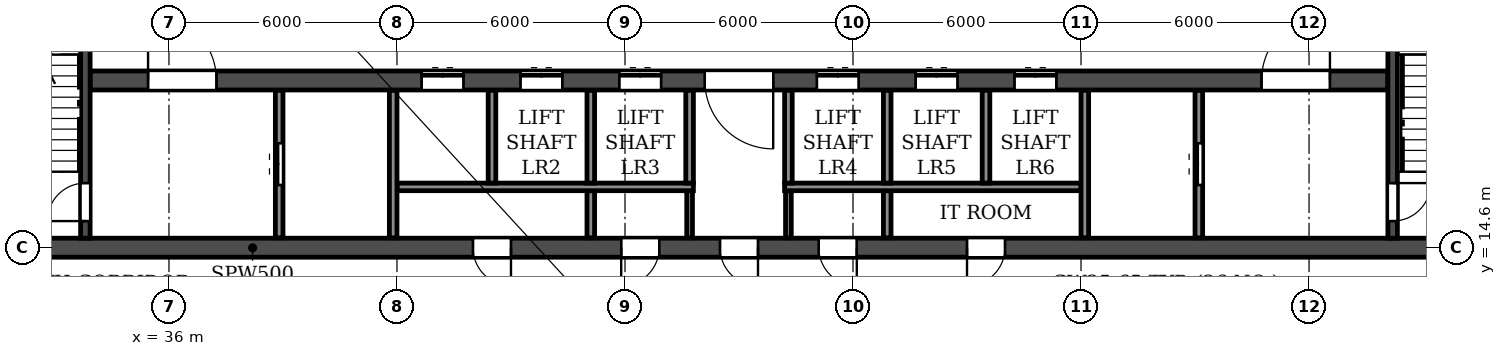
"""IFC4 building model, lengths in metres.
Left out: names, types, materials, properties, quantities, classifications, styles, units other than length and angle.
Written with IfcOpenShell. Run it as: python <this file> out.ifc"""

import sys

from ifc_helpers import new_model, si_unit, direction, frame, frame_2d, origin, place, context, subcontext, project, spatial, rectangle, extrude, element, fill, save


model = new_model("IFC4")
c1 = context("Model", 3, precision=1e-05, world=origin(), true_north=direction((0.0, 1.0)))
c2 = subcontext(c1, "Body", "Model", "MODEL_VIEW")
j1 = project(units=[si_unit("LENGTHUNIT", "METRE"), si_unit("PLANEANGLEUNIT", "RADIAN")], contexts=[c1])
p1 = place(None, origin())
s1 = spatial("IfcSite", under=j1, at=p1, CompositionType="ELEMENT")
p2 = place(p1, origin())
s2 = spatial("IfcBuilding", under=s1, at=p2, CompositionType="ELEMENT")
p3 = place(p2, frame((0.0, 0.0, 76.2)))
s3 = spatial("IfcBuildingStorey", under=s2, at=p3, CompositionType="ELEMENT", Elevation=76.2)
p4 = place(p3, frame((8.6, 14.6, 0.0), z_axis=(0.0, 0.0, 1.0), x_axis=(1.0, 0.0, 0.0)))
e1 = element("IfcWall", 1, at=p4, inside=s3, PredefinedType="SOLIDWALL", context=c2, shape_type="SweptSolid", body=[
    extrude(rectangle(XDim=84.8, YDim=0.5, at=frame_2d((42.4, 0.0))), origin(), (0.0, 0.0, 1.0), 3.06),
])
p5 = place(p4, frame((2.25, 0.0, 0.0)))
e2 = element("IfcOpeningElement", 2, at=p5, cuts=e1, PredefinedType="OPENING", context=c2, shape_type="SweptSolid", body=[
    extrude(rectangle(XDim=1.0, YDim=2.1, at=frame_2d((0.5, 1.05))), frame((0.0, 0.26, 0.0), z_axis=(0.0, -1.0, 0.0), x_axis=(1.0, 0.0, 0.0)), (0.0, 0.0, 1.0), 0.52),
])
p6 = place(p4, frame((6.95, 0.0, 0.0)))
e3 = element("IfcOpeningElement", 3, at=p6, cuts=e1, PredefinedType="OPENING", context=c2, shape_type="SweptSolid", body=[
    extrude(rectangle(XDim=1.0, YDim=2.1, at=frame_2d((0.5, 1.05))), frame((0.0, 0.26, 0.0), z_axis=(0.0, -1.0, 0.0), x_axis=(1.0, 0.0, 0.0)), (0.0, 0.0, 1.0), 0.52),
])
p7 = place(p4, frame((10.3, 0.0, 0.0)))
e4 = element("IfcOpeningElement", 4, at=p7, cuts=e1, PredefinedType="OPENING", context=c2, shape_type="SweptSolid", body=[
    extrude(rectangle(XDim=1.0, YDim=2.1, at=frame_2d((0.5, 1.05))), frame((0.0, 0.26, 0.0), z_axis=(0.0, -1.0, 0.0), x_axis=(1.0, 0.0, 0.0)), (0.0, 0.0, 1.0), 0.52),
])
p8 = place(p4, frame((18.2, 0.0, 0.0)))
e5 = element("IfcOpeningElement", 5, at=p8, cuts=e1, PredefinedType="OPENING", context=c2, shape_type="SweptSolid", body=[
    extrude(rectangle(XDim=1.0, YDim=2.1, at=frame_2d((0.5, 1.05))), frame((0.0, 0.26, 0.0), z_axis=(0.0, -1.0, 0.0), x_axis=(1.0, 0.0, 0.0)), (0.0, 0.0, 1.0), 0.52),
])
p9 = place(p4, frame((22.8, 0.0, 0.0)))
e6 = element("IfcOpeningElement", 6, at=p9, cuts=e1, PredefinedType="OPENING", context=c2, shape_type="SweptSolid", body=[
    extrude(rectangle(XDim=1.0, YDim=2.1, at=frame_2d((0.5, 1.05))), frame((0.0, 0.26, 0.0), z_axis=(0.0, -1.0, 0.0), x_axis=(1.0, 0.0, 0.0)), (0.0, 0.0, 1.0), 0.52),
])
p10 = place(p4, frame((35.4, 0.0, 0.0)))
e7 = element("IfcOpeningElement", 7, at=p10, cuts=e1, PredefinedType="OPENING", context=c2, shape_type="SweptSolid", body=[
    extrude(rectangle(XDim=1.0, YDim=2.1, at=frame_2d((0.5, 1.05))), frame((0.0, 0.26, 0.0), z_axis=(0.0, -1.0, 0.0), x_axis=(1.0, 0.0, 0.0)), (0.0, 0.0, 1.0), 0.52),
])
p11 = place(p4, frame((39.3, 0.0, 0.0)))
e8 = element("IfcOpeningElement", 8, at=p11, cuts=e1, PredefinedType="OPENING", context=c2, shape_type="SweptSolid", body=[
    extrude(rectangle(XDim=1.0, YDim=2.1, at=frame_2d((0.5, 1.05))), frame((0.0, 0.26, 0.0), z_axis=(0.0, -1.0, 0.0), x_axis=(1.0, 0.0, 0.0)), (0.0, 0.0, 1.0), 0.52),
])
p12 = place(p4, frame((41.9, 0.0, 0.0)))
e9 = element("IfcOpeningElement", 9, at=p12, cuts=e1, PredefinedType="OPENING", context=c2, shape_type="SweptSolid", body=[
    extrude(rectangle(XDim=1.0, YDim=2.1, at=frame_2d((0.5, 1.05))), frame((0.0, 0.26, 0.0), z_axis=(0.0, -1.0, 0.0), x_axis=(1.0, 0.0, 0.0)), (0.0, 0.0, 1.0), 0.52),
])
p13 = place(p4, frame((44.5, 0.0, 0.0)))
e10 = element("IfcOpeningElement", 10, at=p13, cuts=e1, PredefinedType="OPENING", context=c2, shape_type="SweptSolid", body=[
    extrude(rectangle(XDim=1.0, YDim=2.1, at=frame_2d((0.5, 1.05))), frame((0.0, 0.26, 0.0), z_axis=(0.0, -1.0, 0.0), x_axis=(1.0, 0.0, 0.0)), (0.0, 0.0, 1.0), 0.52),
])
p14 = place(p4, frame((48.4, 0.0, 0.0)))
e11 = element("IfcOpeningElement", 11, at=p14, cuts=e1, PredefinedType="OPENING", context=c2, shape_type="SweptSolid", body=[
    extrude(rectangle(XDim=1.0, YDim=2.1, at=frame_2d((0.5, 1.05))), frame((0.0, 0.26, 0.0), z_axis=(0.0, -1.0, 0.0), x_axis=(1.0, 0.0, 0.0)), (0.0, 0.0, 1.0), 0.52),
])
p15 = place(p4, frame((61.0, 0.0, 0.0)))
e12 = element("IfcOpeningElement", 12, at=p15, cuts=e1, PredefinedType="OPENING", context=c2, shape_type="SweptSolid", body=[
    extrude(rectangle(XDim=1.0, YDim=2.1, at=frame_2d((0.5, 1.05))), frame((0.0, 0.26, 0.0), z_axis=(0.0, -1.0, 0.0), x_axis=(1.0, 0.0, 0.0)), (0.0, 0.0, 1.0), 0.52),
])
p16 = place(p4, frame((65.6, 0.0, 0.0)))
e13 = element("IfcOpeningElement", 13, at=p16, cuts=e1, PredefinedType="OPENING", context=c2, shape_type="SweptSolid", body=[
    extrude(rectangle(XDim=1.0, YDim=2.1, at=frame_2d((0.5, 1.05))), frame((0.0, 0.26, 0.0), z_axis=(0.0, -1.0, 0.0), x_axis=(1.0, 0.0, 0.0)), (0.0, 0.0, 1.0), 0.52),
])
p17 = place(p4, frame((73.5, 0.0, 0.0)))
e14 = element("IfcOpeningElement", 14, at=p17, cuts=e1, PredefinedType="OPENING", context=c2, shape_type="SweptSolid", body=[
    extrude(rectangle(XDim=1.0, YDim=2.1, at=frame_2d((0.5, 1.05))), frame((0.0, 0.26, 0.0), z_axis=(0.0, -1.0, 0.0), x_axis=(1.0, 0.0, 0.0)), (0.0, 0.0, 1.0), 0.52),
])
p18 = place(p4, frame((76.55, 0.0, 0.0)))
e15 = element("IfcOpeningElement", 15, at=p18, cuts=e1, PredefinedType="OPENING", context=c2, shape_type="SweptSolid", body=[
    extrude(rectangle(XDim=1.0, YDim=2.1, at=frame_2d((0.5, 1.05))), frame((0.0, 0.26, 0.0), z_axis=(0.0, -1.0, 0.0), x_axis=(1.0, 0.0, 0.0)), (0.0, 0.0, 1.0), 0.52),
])
p19 = place(p4, frame((81.0, 0.0, 0.0)))
e16 = element("IfcOpeningElement", 16, at=p19, cuts=e1, PredefinedType="OPENING", context=c2, shape_type="SweptSolid", body=[
    extrude(rectangle(XDim=1.5, YDim=2.1, at=frame_2d((0.75, 1.05))), frame((0.0, 0.26, 0.0), z_axis=(0.0, -1.0, 0.0), x_axis=(1.0, 0.0, 0.0)), (0.0, 0.0, 1.0), 0.52),
])
p20 = place(p3, frame((33.925, 19.0, 0.0), z_axis=(0.0, 0.0, 1.0), x_axis=(1.0, 0.0, 0.0)))
e17 = element("IfcWall", 17, at=p20, inside=s3, PredefinedType="SOLIDWALL", context=c2, shape_type="SweptSolid", body=[
    extrude(rectangle(XDim=34.15, YDim=0.5, at=frame_2d((17.075, 0.0))), origin(), (0.0, 0.0, 1.0), 3.06),
])
p21 = place(p20, frame((16.175, 0.0, 0.0)))
e18 = element("IfcOpeningElement", 18, at=p21, cuts=e17, PredefinedType="OPENING", context=c2, shape_type="SweptSolid", body=[
    extrude(rectangle(XDim=1.8, YDim=2.1, at=frame_2d((0.9, 1.05))), frame((0.0, 0.26, 0.0), z_axis=(0.0, -1.0, 0.0), x_axis=(1.0, 0.0, 0.0)), (0.0, 0.0, 1.0), 0.52),
])
p22 = place(p20, frame((1.525, 0.0, 0.0)))
e19 = element("IfcOpeningElement", 19, at=p22, cuts=e17, PredefinedType="OPENING", context=c2, shape_type="SweptSolid", body=[
    extrude(rectangle(XDim=1.8, YDim=2.1, at=frame_2d((0.9, 1.05))), frame((0.0, 0.26, 0.0), z_axis=(0.0, -1.0, 0.0), x_axis=(1.0, 0.0, 0.0)), (0.0, 0.0, 1.0), 0.52),
])
p23 = place(p20, frame((8.725, 0.0, 0.0)))
e20 = element("IfcOpeningElement", 20, at=p23, cuts=e17, PredefinedType="OPENING", context=c2, shape_type="SweptSolid", body=[
    extrude(rectangle(XDim=1.1, YDim=2.1, at=frame_2d((0.55, 1.05))), frame((0.0, 0.26, 0.0), z_axis=(0.0, -1.0, 0.0), x_axis=(1.0, 0.0, 0.0)), (0.0, 0.0, 1.0), 0.52),
])
p24 = place(p20, frame((11.325, 0.0, 0.0)))
e21 = element("IfcOpeningElement", 21, at=p24, cuts=e17, PredefinedType="OPENING", context=c2, shape_type="SweptSolid", body=[
    extrude(rectangle(XDim=1.1, YDim=2.1, at=frame_2d((0.55, 1.05))), frame((0.0, 0.26, 0.0), z_axis=(0.0, -1.0, 0.0), x_axis=(1.0, 0.0, 0.0)), (0.0, 0.0, 1.0), 0.52),
])
p25 = place(p20, frame((13.925, 0.0, 0.0)))
e22 = element("IfcOpeningElement", 22, at=p25, cuts=e17, PredefinedType="OPENING", context=c2, shape_type="SweptSolid", body=[
    extrude(rectangle(XDim=1.1, YDim=2.1, at=frame_2d((0.55, 1.05))), frame((0.0, 0.26, 0.0), z_axis=(0.0, -1.0, 0.0), x_axis=(1.0, 0.0, 0.0)), (0.0, 0.0, 1.0), 0.52),
])
p26 = place(p20, frame((19.125, 0.0, 0.0)))
e23 = element("IfcOpeningElement", 23, at=p26, cuts=e17, PredefinedType="OPENING", context=c2, shape_type="SweptSolid", body=[
    extrude(rectangle(XDim=1.1, YDim=2.1, at=frame_2d((0.55, 1.05))), frame((0.0, 0.26, 0.0), z_axis=(0.0, -1.0, 0.0), x_axis=(1.0, 0.0, 0.0)), (0.0, 0.0, 1.0), 0.52),
])
p27 = place(p20, frame((21.725, 0.0, 0.0)))
e24 = element("IfcOpeningElement", 24, at=p27, cuts=e17, PredefinedType="OPENING", context=c2, shape_type="SweptSolid", body=[
    extrude(rectangle(XDim=1.1, YDim=2.1, at=frame_2d((0.55, 1.05))), frame((0.0, 0.26, 0.0), z_axis=(0.0, -1.0, 0.0), x_axis=(1.0, 0.0, 0.0)), (0.0, 0.0, 1.0), 0.52),
])
p28 = place(p20, frame((24.325, 0.0, 0.0)))
e25 = element("IfcOpeningElement", 25, at=p28, cuts=e17, PredefinedType="OPENING", context=c2, shape_type="SweptSolid", body=[
    extrude(rectangle(XDim=1.1, YDim=2.1, at=frame_2d((0.55, 1.05))), frame((0.0, 0.26, 0.0), z_axis=(0.0, -1.0, 0.0), x_axis=(1.0, 0.0, 0.0)), (0.0, 0.0, 1.0), 0.52),
])
p29 = place(p20, frame((30.825, 0.0, 0.0)))
e26 = element("IfcOpeningElement", 26, at=p29, cuts=e17, PredefinedType="OPENING", context=c2, shape_type="SweptSolid", body=[
    extrude(rectangle(XDim=1.8, YDim=2.1, at=frame_2d((0.9, 1.05))), frame((0.0, 0.26, 0.0), z_axis=(0.0, -1.0, 0.0), x_axis=(1.0, 0.0, 0.0)), (0.0, 0.0, 1.0), 0.52),
])
p30 = place(p3, frame((33.8, 14.85, 0.0), z_axis=(0.0, 0.0, 1.0), x_axis=(0.0, 1.0, 0.0)))
e27 = element("IfcWall", 27, at=p30, inside=s3, PredefinedType="SOLIDWALL", context=c2, shape_type="SweptSolid", body=[
    extrude(rectangle(XDim=7.625, YDim=0.25, at=frame_2d((3.812, 0.0))), origin(), (0.0, 0.0, 1.0), 3.06),
])
p31 = place(p30, frame((0.45, 0.0, 0.0)))
e28 = element("IfcOpeningElement", 28, at=p31, cuts=e27, PredefinedType="OPENING", context=c2, shape_type="SweptSolid", body=[
    extrude(rectangle(XDim=1.0, YDim=2.1, at=frame_2d((0.5, 1.05))), frame((0.0, 0.135, 0.0), z_axis=(0.0, -1.0, 0.0), x_axis=(1.0, 0.0, 0.0)), (0.0, 0.0, 1.0), 0.27),
])
p32 = place(p3, frame((68.2, 14.85, 0.0), z_axis=(0.0, 0.0, 1.0), x_axis=(0.0, 1.0, 0.0)))
e29 = element("IfcWall", 29, at=p32, inside=s3, PredefinedType="SOLIDWALL", context=c2, shape_type="SweptSolid", body=[
    extrude(rectangle(XDim=7.625, YDim=0.25, at=frame_2d((3.812, 0.0))), origin(), (0.0, 0.0, 1.0), 3.06),
])
p33 = place(p32, frame((0.45, 0.0, 0.0)))
e30 = element("IfcOpeningElement", 30, at=p33, cuts=e29, PredefinedType="OPENING", context=c2, shape_type="SweptSolid", body=[
    extrude(rectangle(XDim=1.0, YDim=2.1, at=frame_2d((0.5, 1.05))), frame((0.0, 0.135, 0.0), z_axis=(0.0, -1.0, 0.0), x_axis=(1.0, 0.0, 0.0)), (0.0, 0.0, 1.0), 0.27),
])
for number, where, z_axis, x_axis in (
    (31, (49.7, 14.86, 0.0), (0.0, 0.0, 1.0), (0.0, 1.0, 0.0)),
    (32, (52.3, 14.86, 0.0), (0.0, 0.0, 1.0), (0.0, 1.0, 0.0)),
):
    element("IfcWall", number, at=place(p3, frame(where, z_axis=z_axis, x_axis=x_axis)), inside=s3, PredefinedType="PARTITIONING", context=c2, shape_type="SweptSolid", body=[
        extrude(rectangle(XDim=1.24, YDim=0.15, at=frame_2d((0.62, 0.0))), origin(), (0.0, 0.0, 1.0), 3.06),
    ])
for number, where, z_axis, x_axis in (
    (33, (47.1, 14.86, 0.0), (0.0, 0.0, 1.0), (0.0, 1.0, 0.0)),
    (34, (54.9, 14.86, 0.0), (0.0, 0.0, 1.0), (0.0, 1.0, 0.0)),
):
    element("IfcWall", number, at=place(p3, frame(where, z_axis=z_axis, x_axis=x_axis)), inside=s3, PredefinedType="PARTITIONING", context=c2, shape_type="SweptSolid", body=[
        extrude(rectangle(XDim=1.24, YDim=0.2, at=frame_2d((0.62, 0.0))), origin(), (0.0, 0.0, 1.0), 3.06),
    ])
for number, where, z_axis, x_axis in (
    (35, (42.0, 16.2, 0.0), (0.0, 0.0, 1.0), (1.0, 0.0, 0.0)),
    (36, (52.2, 16.2, 0.0), (0.0, 0.0, 1.0), (1.0, 0.0, 0.0)),
):
    element("IfcWall", number, at=place(p3, frame(where, z_axis=z_axis, x_axis=x_axis)), inside=s3, PredefinedType="PARTITIONING", context=c2, shape_type="SweptSolid", body=[
        extrude(rectangle(XDim=7.8, YDim=0.2, at=frame_2d((3.9, 0.0))), origin(), (0.0, 0.0, 1.0), 3.06),
    ])
p34 = place(p3, frame((38.9, 14.86, 0.0), z_axis=(0.0, 0.0, 1.0), x_axis=(0.0, 1.0, 0.0)))
e37 = element("IfcWall", 37, at=p34, inside=s3, PredefinedType="PARTITIONING", context=c2, shape_type="SweptSolid", body=[
    extrude(rectangle(XDim=3.88, YDim=0.2, at=frame_2d((1.94, 0.0))), origin(), (0.0, 0.0, 1.0), 3.06),
])
p35 = place(p34, frame((1.39, 0.0, 0.0)))
e38 = element("IfcOpeningElement", 38, at=p35, cuts=e37, PredefinedType="OPENING", context=c2, shape_type="SweptSolid", body=[
    extrude(rectangle(XDim=1.1, YDim=2.1, at=frame_2d((0.55, 1.05))), frame((0.0, 0.11, 0.0), z_axis=(0.0, -1.0, 0.0), x_axis=(1.0, 0.0, 0.0)), (0.0, 0.0, 1.0), 0.22),
])
p36 = place(p3, frame((41.9, 14.86, 0.0), z_axis=(0.0, 0.0, 1.0), x_axis=(0.0, 1.0, 0.0)))
e39 = element("IfcWall", 39, at=p36, inside=s3, PredefinedType="PARTITIONING", context=c2, shape_type="SweptSolid", body=[
    extrude(rectangle(XDim=3.88, YDim=0.2, at=frame_2d((1.94, 0.0))), origin(), (0.0, 0.0, 1.0), 3.06),
])
for number, where, z_axis, x_axis in (
    (40, (44.5, 16.3, 0.0), (0.0, 0.0, 1.0), (0.0, 1.0, 0.0)),
    (41, (47.1, 16.3, 0.0), (0.0, 0.0, 1.0), (0.0, 1.0, 0.0)),
    (42, (49.7, 16.3, 0.0), (0.0, 0.0, 1.0), (0.0, 1.0, 0.0)),
    (43, (52.3, 16.3, 0.0), (0.0, 0.0, 1.0), (0.0, 1.0, 0.0)),
    (44, (54.9, 16.3, 0.0), (0.0, 0.0, 1.0), (0.0, 1.0, 0.0)),
    (45, (57.5, 16.3, 0.0), (0.0, 0.0, 1.0), (0.0, 1.0, 0.0)),
):
    element("IfcWall", number, at=place(p3, frame(where, z_axis=z_axis, x_axis=x_axis)), inside=s3, PredefinedType="PARTITIONING", context=c2, shape_type="SweptSolid", body=[
        extrude(rectangle(XDim=2.44, YDim=0.2, at=frame_2d((1.22, 0.0))), origin(), (0.0, 0.0, 1.0), 3.06),
    ])
p37 = place(p3, frame((60.1, 14.86, 0.0), z_axis=(0.0, 0.0, 1.0), x_axis=(0.0, 1.0, 0.0)))
e46 = element("IfcWall", 46, at=p37, inside=s3, PredefinedType="PARTITIONING", context=c2, shape_type="SweptSolid", body=[
    extrude(rectangle(XDim=3.88, YDim=0.2, at=frame_2d((1.94, 0.0))), origin(), (0.0, 0.0, 1.0), 3.06),
])
p38 = place(p3, frame((63.1, 14.86, 0.0), z_axis=(0.0, 0.0, 1.0), x_axis=(0.0, 1.0, 0.0)))
e47 = element("IfcWall", 47, at=p38, inside=s3, PredefinedType="PARTITIONING", context=c2, shape_type="SweptSolid", body=[
    extrude(rectangle(XDim=3.88, YDim=0.2, at=frame_2d((1.94, 0.0))), origin(), (0.0, 0.0, 1.0), 3.06),
])
p39 = place(p38, frame((1.39, 0.0, 0.0)))
e48 = element("IfcOpeningElement", 48, at=p39, cuts=e47, PredefinedType="OPENING", context=c2, shape_type="SweptSolid", body=[
    extrude(rectangle(XDim=1.1, YDim=2.1, at=frame_2d((0.55, 1.05))), frame((0.0, 0.11, 0.0), z_axis=(0.0, -1.0, 0.0), x_axis=(1.0, 0.0, 0.0)), (0.0, 0.0, 1.0), 0.22),
])
p40 = place(p10, frame((1.0, 0.0, 0.0), z_axis=(0.0, 0.0, 1.0), x_axis=(-1.0, 0.0, 0.0)))
e49 = element("IfcDoor", 49, at=p40, inside=s3, OperationType="SINGLE_SWING_LEFT", PredefinedType="DOOR", context=c2, shape_type="SweptSolid", body=[
    extrude(rectangle(XDim=1.0, YDim=2.1, at=frame_2d((0.5, 1.05))), frame((0.0, 0.025, 0.0), z_axis=(0.0, -1.0, 0.0), x_axis=(1.0, 0.0, 0.0)), (0.0, 0.0, 1.0), 0.05),
])
fill(e7, e49)
p41 = place(p11, frame((1.0, 0.0, 0.0), z_axis=(0.0, 0.0, 1.0), x_axis=(-1.0, 0.0, 0.0)))
e50 = element("IfcDoor", 50, at=p41, inside=s3, OperationType="SINGLE_SWING_RIGHT", PredefinedType="DOOR", context=c2, shape_type="SweptSolid", body=[
    extrude(rectangle(XDim=1.0, YDim=2.1, at=frame_2d((0.5, 1.05))), frame((0.0, 0.025, 0.0), z_axis=(0.0, -1.0, 0.0), x_axis=(1.0, 0.0, 0.0)), (0.0, 0.0, 1.0), 0.05),
])
fill(e8, e50)
p42 = place(p12, frame((1.0, 0.0, 0.0), z_axis=(0.0, 0.0, 1.0), x_axis=(-1.0, 0.0, 0.0)))
e51 = element("IfcDoor", 51, at=p42, inside=s3, OperationType="SINGLE_SWING_LEFT", PredefinedType="DOOR", context=c2, shape_type="SweptSolid", body=[
    extrude(rectangle(XDim=1.0, YDim=2.1, at=frame_2d((0.5, 1.05))), frame((0.0, 0.025, 0.0), z_axis=(0.0, -1.0, 0.0), x_axis=(1.0, 0.0, 0.0)), (0.0, 0.0, 1.0), 0.05),
])
fill(e9, e51)
p43 = place(p13, frame((1.0, 0.0, 0.0), z_axis=(0.0, 0.0, 1.0), x_axis=(-1.0, 0.0, 0.0)))
e52 = element("IfcDoor", 52, at=p43, inside=s3, OperationType="SINGLE_SWING_LEFT", PredefinedType="DOOR", context=c2, shape_type="SweptSolid", body=[
    extrude(rectangle(XDim=1.0, YDim=2.1, at=frame_2d((0.5, 1.05))), frame((0.0, 0.025, 0.0), z_axis=(0.0, -1.0, 0.0), x_axis=(1.0, 0.0, 0.0)), (0.0, 0.0, 1.0), 0.05),
])
fill(e10, e52)
p44 = place(p14, frame((1.0, 0.0, 0.0), z_axis=(0.0, 0.0, 1.0), x_axis=(-1.0, 0.0, 0.0)))
e53 = element("IfcDoor", 53, at=p44, inside=s3, OperationType="SINGLE_SWING_RIGHT", PredefinedType="DOOR", context=c2, shape_type="SweptSolid", body=[
    extrude(rectangle(XDim=1.0, YDim=2.1, at=frame_2d((0.5, 1.05))), frame((0.0, 0.025, 0.0), z_axis=(0.0, -1.0, 0.0), x_axis=(1.0, 0.0, 0.0)), (0.0, 0.0, 1.0), 0.05),
])
fill(e11, e53)
p45 = place(p39, origin())
e54 = element("IfcDoor", 54, at=p45, inside=s3, OperationType="DOUBLE_DOOR_SLIDING", PredefinedType="DOOR", context=c2, shape_type="SweptSolid", body=[
    extrude(rectangle(XDim=1.1, YDim=2.1, at=frame_2d((0.55, 1.05))), frame((0.0, 0.025, 0.0), z_axis=(0.0, -1.0, 0.0), x_axis=(1.0, 0.0, 0.0)), (0.0, 0.0, 1.0), 0.05),
])
fill(e48, e54)
p46 = place(p33, frame((1.0, 0.0, 0.0), z_axis=(0.0, 0.0, 1.0), x_axis=(-1.0, 0.0, 0.0)))
e55 = element("IfcDoor", 55, at=p46, inside=s3, OperationType="SINGLE_SWING_LEFT", PredefinedType="DOOR", context=c2, shape_type="SweptSolid", body=[
    extrude(rectangle(XDim=1.0, YDim=2.1, at=frame_2d((0.5, 1.05))), frame((0.0, 0.025, 0.0), z_axis=(0.0, -1.0, 0.0), x_axis=(1.0, 0.0, 0.0)), (0.0, 0.0, 1.0), 0.05),
])
fill(e30, e55)
p47 = place(p31, origin())
e56 = element("IfcDoor", 56, at=p47, inside=s3, OperationType="SINGLE_SWING_LEFT", PredefinedType="DOOR", context=c2, shape_type="SweptSolid", body=[
    extrude(rectangle(XDim=1.0, YDim=2.1, at=frame_2d((0.5, 1.05))), frame((0.0, 0.025, 0.0), z_axis=(0.0, -1.0, 0.0), x_axis=(1.0, 0.0, 0.0)), (0.0, 0.0, 1.0), 0.05),
])
fill(e28, e56)
p48 = place(p35, origin())
e57 = element("IfcDoor", 57, at=p48, inside=s3, OperationType="DOUBLE_DOOR_SLIDING", PredefinedType="DOOR", context=c2, shape_type="SweptSolid", body=[
    extrude(rectangle(XDim=1.1, YDim=2.1, at=frame_2d((0.55, 1.05))), frame((0.0, 0.025, 0.0), z_axis=(0.0, -1.0, 0.0), x_axis=(1.0, 0.0, 0.0)), (0.0, 0.0, 1.0), 0.05),
])
fill(e38, e57)
p49 = place(p21, frame((1.8, 0.0, 0.0), z_axis=(0.0, 0.0, 1.0), x_axis=(-1.0, 0.0, 0.0)))
e58 = element("IfcDoor", 58, at=p49, inside=s3, OperationType="DOUBLE_DOOR_SINGLE_SWING", PredefinedType="DOOR", context=c2, shape_type="SweptSolid", body=[
    extrude(rectangle(XDim=1.8, YDim=2.1, at=frame_2d((0.9, 1.05))), frame((0.0, 0.025, 0.0), z_axis=(0.0, -1.0, 0.0), x_axis=(1.0, 0.0, 0.0)), (0.0, 0.0, 1.0), 0.05),
])
fill(e18, e58)
p50 = place(p22, origin())
e59 = element("IfcDoor", 59, at=p50, inside=s3, OperationType="DOUBLE_DOOR_SINGLE_SWING", PredefinedType="DOOR", context=c2, shape_type="SweptSolid", body=[
    extrude(rectangle(XDim=1.8, YDim=2.1, at=frame_2d((0.9, 1.05))), frame((0.0, 0.025, 0.0), z_axis=(0.0, -1.0, 0.0), x_axis=(1.0, 0.0, 0.0)), (0.0, 0.0, 1.0), 0.05),
])
fill(e19, e59)
p51 = place(p23, origin())
e60 = element("IfcDoor", 60, at=p51, inside=s3, OperationType="DOUBLE_DOOR_SLIDING", PredefinedType="DOOR", context=c2, shape_type="SweptSolid", body=[
    extrude(rectangle(XDim=1.1, YDim=2.1, at=frame_2d((0.55, 1.05))), frame((0.0, 0.025, 0.0), z_axis=(0.0, -1.0, 0.0), x_axis=(1.0, 0.0, 0.0)), (0.0, 0.0, 1.0), 0.05),
])
fill(e20, e60)
p52 = place(p24, origin())
e61 = element("IfcDoor", 61, at=p52, inside=s3, OperationType="DOUBLE_DOOR_SLIDING", PredefinedType="DOOR", context=c2, shape_type="SweptSolid", body=[
    extrude(rectangle(XDim=1.1, YDim=2.1, at=frame_2d((0.55, 1.05))), frame((0.0, 0.025, 0.0), z_axis=(0.0, -1.0, 0.0), x_axis=(1.0, 0.0, 0.0)), (0.0, 0.0, 1.0), 0.05),
])
fill(e21, e61)
p53 = place(p25, origin())
e62 = element("IfcDoor", 62, at=p53, inside=s3, OperationType="DOUBLE_DOOR_SLIDING", PredefinedType="DOOR", context=c2, shape_type="SweptSolid", body=[
    extrude(rectangle(XDim=1.1, YDim=2.1, at=frame_2d((0.55, 1.05))), frame((0.0, 0.025, 0.0), z_axis=(0.0, -1.0, 0.0), x_axis=(1.0, 0.0, 0.0)), (0.0, 0.0, 1.0), 0.05),
])
fill(e22, e62)
p54 = place(p26, origin())
e63 = element("IfcDoor", 63, at=p54, inside=s3, OperationType="DOUBLE_DOOR_SLIDING", PredefinedType="DOOR", context=c2, shape_type="SweptSolid", body=[
    extrude(rectangle(XDim=1.1, YDim=2.1, at=frame_2d((0.55, 1.05))), frame((0.0, 0.025, 0.0), z_axis=(0.0, -1.0, 0.0), x_axis=(1.0, 0.0, 0.0)), (0.0, 0.0, 1.0), 0.05),
])
fill(e23, e63)
p55 = place(p27, origin())
e64 = element("IfcDoor", 64, at=p55, inside=s3, OperationType="DOUBLE_DOOR_SLIDING", PredefinedType="DOOR", context=c2, shape_type="SweptSolid", body=[
    extrude(rectangle(XDim=1.1, YDim=2.1, at=frame_2d((0.55, 1.05))), frame((0.0, 0.025, 0.0), z_axis=(0.0, -1.0, 0.0), x_axis=(1.0, 0.0, 0.0)), (0.0, 0.0, 1.0), 0.05),
])
fill(e24, e64)
p56 = place(p28, origin())
e65 = element("IfcDoor", 65, at=p56, inside=s3, OperationType="DOUBLE_DOOR_SLIDING", PredefinedType="DOOR", context=c2, shape_type="SweptSolid", body=[
    extrude(rectangle(XDim=1.1, YDim=2.1, at=frame_2d((0.55, 1.05))), frame((0.0, 0.025, 0.0), z_axis=(0.0, -1.0, 0.0), x_axis=(1.0, 0.0, 0.0)), (0.0, 0.0, 1.0), 0.05),
])
fill(e25, e65)
p57 = place(p29, origin())
e66 = element("IfcDoor", 66, at=p57, inside=s3, OperationType="DOUBLE_DOOR_SINGLE_SWING", PredefinedType="DOOR", context=c2, shape_type="SweptSolid", body=[
    extrude(rectangle(XDim=1.8, YDim=2.1, at=frame_2d((0.9, 1.05))), frame((0.0, 0.025, 0.0), z_axis=(0.0, -1.0, 0.0), x_axis=(1.0, 0.0, 0.0)), (0.0, 0.0, 1.0), 0.05),
])
fill(e26, e66)
save(model, sys.argv[1])
